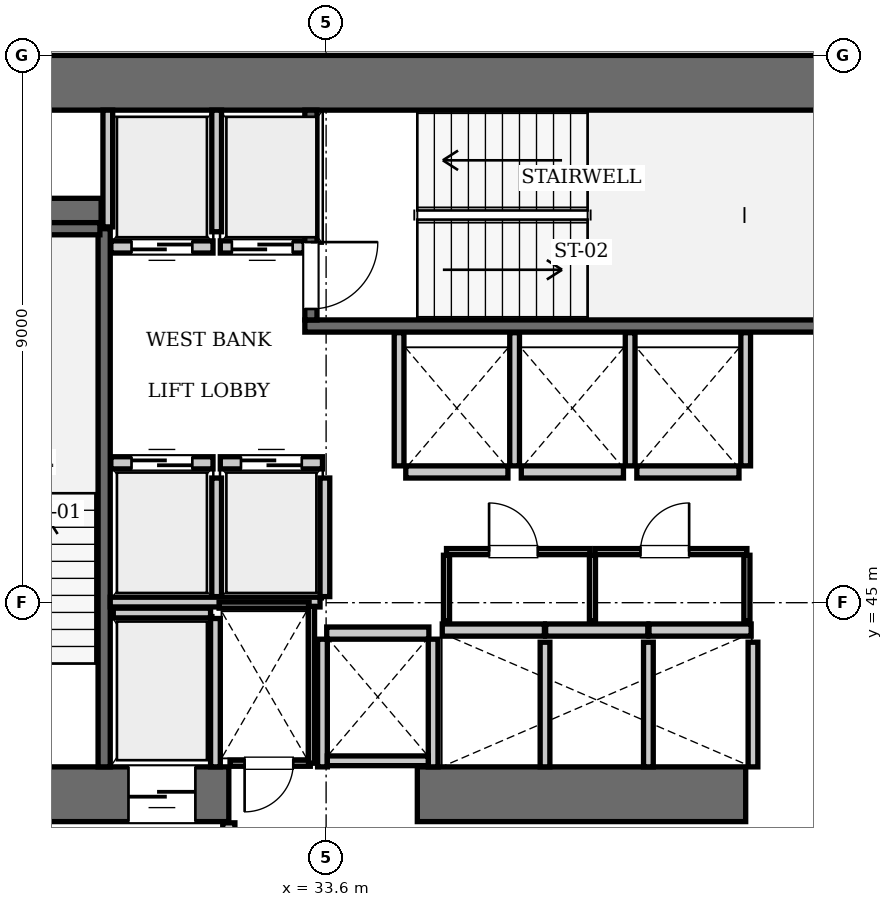
"""IFC4 building model, lengths in metres.
Left out: names, types, materials, properties, quantities, classifications, styles, units other than length and angle.
Written with IfcOpenShell. Run it as: python <this file> out.ifc"""

import sys

from ifc_helpers import new_model, si_unit, direction, frame, frame_2d, origin, place, context, subcontext, project, spatial, rectangle, extrude, element, fill, save


model = new_model("IFC4")
c1 = context("Model", 3, precision=1e-05, world=origin(), true_north=direction((0.0, 1.0)))
c2 = subcontext(c1, "Body", "Model", "MODEL_VIEW")
j1 = project(units=[si_unit("LENGTHUNIT", "METRE"), si_unit("PLANEANGLEUNIT", "RADIAN")], contexts=[c1])
p1 = place(None, origin())
s1 = spatial("IfcSite", under=j1, at=p1, CompositionType="ELEMENT")
p2 = place(p1, origin())
s2 = spatial("IfcBuilding", under=s1, at=p2, CompositionType="ELEMENT")
p3 = place(p2, frame((0.0, 0.0, 107.8)))
s3 = spatial("IfcBuildingStorey", under=s2, at=p3, CompositionType="ELEMENT", Elevation=107.8)
p4 = place(p3, frame((25.2, 53.55, 0.0), z_axis=(0.0, 0.0, 1.0), x_axis=(1.0, 0.0, 0.0)))
e1 = element("IfcWall", 1, at=p4, inside=s3, PredefinedType="SHEAR", context=c2, shape_type="SweptSolid", body=[
    extrude(rectangle(XDim=25.2, YDim=0.9, at=frame_2d((12.6, 0.0))), origin(), (0.0, 0.0, 1.0), 3.85),
])
p5 = place(p3, frame((25.2, 41.85, 0.0), z_axis=(0.0, 0.0, 1.0), x_axis=(1.0, 0.0, 0.0)))
e2 = element("IfcWall", 2, at=p5, inside=s3, PredefinedType="SHEAR", context=c2, shape_type="SweptSolid", body=[
    extrude(rectangle(XDim=6.8, YDim=0.9, at=frame_2d((3.4, 0.0))), origin(), (0.0, 0.0, 1.0), 3.85),
])
p6 = place(p5, frame((1.65, 0.0, 0.0)))
e3 = element("IfcOpeningElement", 3, at=p6, cuts=e2, PredefinedType="OPENING", context=c2, shape_type="SweptSolid", body=[
    extrude(rectangle(XDim=1.15, YDim=2.15, at=frame_2d((0.575, 1.075))), frame((0.0, 0.46, 0.0), z_axis=(0.0, -1.0, 0.0), x_axis=(1.0, 0.0, 0.0)), (0.0, 0.0, 1.0), 0.92),
])
p7 = place(p5, frame((5.15, 0.0, 0.0)))
e4 = element("IfcOpeningElement", 4, at=p7, cuts=e2, PredefinedType="OPENING", context=c2, shape_type="SweptSolid", body=[
    extrude(rectangle(XDim=1.1, YDim=2.2, at=frame_2d((0.55, 1.1))), frame((0.0, 0.46, 0.0), z_axis=(0.0, -1.0, 0.0), x_axis=(1.0, 0.0, 0.0)), (0.0, 0.0, 1.0), 0.92),
])
p8 = place(p3, frame((35.1, 41.85, 0.0), z_axis=(0.0, 0.0, 1.0), x_axis=(1.0, 0.0, 0.0)))
e5 = element("IfcWall", 5, at=p8, inside=s3, PredefinedType="SHEAR", context=c2, shape_type="SweptSolid", body=[
    extrude(rectangle(XDim=5.4, YDim=0.9, at=frame_2d((2.7, 0.0))), origin(), (0.0, 0.0, 1.0), 3.85),
])
p9 = place(p3, frame((26.1, 51.4, 0.0), z_axis=(0.0, 0.0, 1.0), x_axis=(1.0, 0.0, 0.0)))
e6 = element("IfcWall", 6, at=p9, inside=s3, PredefinedType="SHEAR", context=c2, shape_type="SweptSolid", body=[
    extrude(rectangle(XDim=3.8, YDim=0.5, at=frame_2d((1.9, 0.0))), origin(), (0.0, 0.0, 1.0), 3.85),
])
p10 = place(p3, frame((29.95, 42.3, 0.0), z_axis=(0.0, 0.0, 1.0), x_axis=(0.0, 1.0, 0.0)))
e7 = element("IfcWall", 7, at=p10, inside=s3, PredefinedType="SOLIDWALL", context=c2, shape_type="SweptSolid", body=[
    extrude(rectangle(XDim=8.85, YDim=0.2, at=frame_2d((4.425, 0.0))), origin(), (0.0, 0.0, 1.0), 3.61),
])
p11 = place(p3, frame((26.38, 51.15, 0.0), z_axis=(0.0, 0.0, 1.0), x_axis=(1.0, 0.0, 0.0)))
e8 = element("IfcWall", 8, at=p11, inside=s3, PredefinedType="SOLIDWALL", context=c2, shape_type="SweptSolid", body=[
    extrude(rectangle(XDim=3.5, YDim=0.2, at=frame_2d((1.75, 0.0))), origin(), (0.0, 0.0, 1.0), 3.61),
])
p12 = place(p3, frame((33.25, 49.55, 0.0), z_axis=(0.0, 0.0, 1.0), x_axis=(1.0, 0.0, 0.0)))
e9 = element("IfcWall", 9, at=p12, inside=s3, PredefinedType="SOLIDWALL", context=c2, shape_type="SweptSolid", body=[
    extrude(rectangle(XDim=9.1, YDim=0.2, at=frame_2d((4.55, 0.0))), origin(), (0.0, 0.0, 1.0), 3.61),
])
p13 = place(p3, frame((33.35, 49.65, 0.0), z_axis=(0.0, 0.0, 1.0), x_axis=(0.0, 1.0, 0.0)))
e10 = element("IfcWall", 10, at=p13, inside=s3, PredefinedType="SOLIDWALL", context=c2, shape_type="SweptSolid", body=[
    extrude(rectangle(XDim=3.45, YDim=0.2, at=frame_2d((1.725, 0.0))), origin(), (0.0, 0.0, 1.0), 3.61),
])
p14 = place(p13, frame((0.18, 0.0, 0.0)))
e11 = element("IfcOpeningElement", 11, at=p14, cuts=e10, PredefinedType="OPENING", context=c2, shape_type="SweptSolid", body=[
    extrude(rectangle(XDim=1.1, YDim=2.15, at=frame_2d((0.55, 1.075))), frame((0.0, 0.11, 0.0), z_axis=(0.0, -1.0, 0.0), x_axis=(1.0, 0.0, 0.0)), (0.0, 0.0, 1.0), 0.22),
])
p15 = place(p3, frame((30.06, 47.3, 0.0), z_axis=(0.0, 0.0, 1.0), x_axis=(1.0, 0.0, 0.0)))
e12 = element("IfcWall", 12, at=p15, inside=s3, PredefinedType="SOLIDWALL", context=c2, shape_type="SweptSolid", body=[
    extrude(rectangle(XDim=1.68, YDim=0.2, at=frame_2d((0.84, 0.0))), origin(), (0.0, 0.0, 1.0), 3.61),
])
p16 = place(p15, frame((0.34, 0.0, 0.0)))
e13 = element("IfcOpeningElement", 13, at=p16, cuts=e12, PredefinedType="OPENING", context=c2, shape_type="SweptSolid", body=[
    extrude(rectangle(XDim=1.0, YDim=2.15, at=frame_2d((0.5, 1.075))), frame((0.0, 0.11, 0.0), z_axis=(0.0, -1.0, 0.0), x_axis=(1.0, 0.0, 0.0)), (0.0, 0.0, 1.0), 0.22),
])
p17 = place(p3, frame((31.86, 47.3, 0.0), z_axis=(0.0, 0.0, 1.0), x_axis=(1.0, 0.0, 0.0)))
e14 = element("IfcWall", 14, at=p17, inside=s3, PredefinedType="SOLIDWALL", context=c2, shape_type="SweptSolid", body=[
    extrude(rectangle(XDim=1.68, YDim=0.2, at=frame_2d((0.84, 0.0))), origin(), (0.0, 0.0, 1.0), 3.61),
])
p18 = place(p17, frame((0.34, 0.0, 0.0)))
e15 = element("IfcOpeningElement", 15, at=p18, cuts=e14, PredefinedType="OPENING", context=c2, shape_type="SweptSolid", body=[
    extrude(rectangle(XDim=1.0, YDim=2.15, at=frame_2d((0.5, 1.075))), frame((0.0, 0.11, 0.0), z_axis=(0.0, -1.0, 0.0), x_axis=(1.0, 0.0, 0.0)), (0.0, 0.0, 1.0), 0.22),
])
p19 = place(p3, frame((30.06, 50.85, 0.0), z_axis=(0.0, 0.0, 1.0), x_axis=(1.0, 0.0, 0.0)))
e16 = element("IfcWall", 16, at=p19, inside=s3, PredefinedType="SOLIDWALL", context=c2, shape_type="SweptSolid", body=[
    extrude(rectangle(XDim=1.68, YDim=0.2, at=frame_2d((0.84, 0.0))), origin(), (0.0, 0.0, 1.0), 3.61),
])
p20 = place(p19, frame((0.34, 0.0, 0.0)))
e17 = element("IfcOpeningElement", 17, at=p20, cuts=e16, PredefinedType="OPENING", context=c2, shape_type="SweptSolid", body=[
    extrude(rectangle(XDim=1.0, YDim=2.15, at=frame_2d((0.5, 1.075))), frame((0.0, 0.11, 0.0), z_axis=(0.0, -1.0, 0.0), x_axis=(1.0, 0.0, 0.0)), (0.0, 0.0, 1.0), 0.22),
])
p21 = place(p3, frame((31.86, 50.85, 0.0), z_axis=(0.0, 0.0, 1.0), x_axis=(1.0, 0.0, 0.0)))
e18 = element("IfcWall", 18, at=p21, inside=s3, PredefinedType="SOLIDWALL", context=c2, shape_type="SweptSolid", body=[
    extrude(rectangle(XDim=1.38, YDim=0.2, at=frame_2d((0.69, 0.0))), origin(), (0.0, 0.0, 1.0), 3.61),
])
p22 = place(p21, frame((0.19, 0.0, 0.0)))
e19 = element("IfcOpeningElement", 19, at=p22, cuts=e18, PredefinedType="OPENING", context=c2, shape_type="SweptSolid", body=[
    extrude(rectangle(XDim=1.0, YDim=2.15, at=frame_2d((0.5, 1.075))), frame((0.0, 0.11, 0.0), z_axis=(0.0, -1.0, 0.0), x_axis=(1.0, 0.0, 0.0)), (0.0, 0.0, 1.0), 0.22),
])
for number, where, z_axis, x_axis in (
    (20, (35.51, 44.55, 0.0), (0.0, 0.0, 1.0), (1.0, 0.0, 0.0)),
    (21, (37.21, 44.55, 0.0), (0.0, 0.0, 1.0), (1.0, 0.0, 0.0)),
):
    element("IfcWall", number, at=place(p3, frame(where, z_axis=z_axis, x_axis=x_axis)), inside=s3, PredefinedType="SOLIDWALL", context=c2, shape_type="SweptSolid", body=[
        extrude(rectangle(XDim=1.68, YDim=0.2, at=frame_2d((0.84, 0.0))), origin(), (0.0, 0.0, 1.0), 3.61),
    ])
for number, where, z_axis, x_axis in (
    (22, (38.91, 44.55, 0.0), (0.0, 0.0, 1.0), (1.0, 0.0, 0.0)),
    (23, (34.91, 47.15, 0.0), (0.0, 0.0, 1.0), (1.0, 0.0, 0.0)),
):
    element("IfcWall", number, at=place(p3, frame(where, z_axis=z_axis, x_axis=x_axis)), inside=s3, PredefinedType="SOLIDWALL", context=c2, shape_type="SweptSolid", body=[
        extrude(rectangle(XDim=1.68, YDim=0.2, at=frame_2d((0.84, 0.0))), origin(), (0.0, 0.0, 1.0), 3.61),
    ])
for number, where, z_axis, x_axis in (
    (24, (36.81, 47.15, 0.0), (0.0, 0.0, 1.0), (1.0, 0.0, 0.0)),
    (25, (38.71, 47.15, 0.0), (0.0, 0.0, 1.0), (1.0, 0.0, 0.0)),
    (26, (33.61, 44.5, 0.0), (0.0, 0.0, 1.0), (1.0, 0.0, 0.0)),
):
    element("IfcWall", number, at=place(p3, frame(where, z_axis=z_axis, x_axis=x_axis)), inside=s3, PredefinedType="SOLIDWALL", context=c2, shape_type="SweptSolid", body=[
        extrude(rectangle(XDim=1.68, YDim=0.2, at=frame_2d((0.84, 0.0))), origin(), (0.0, 0.0, 1.0), 3.61),
    ])
p23 = place(p3, frame((30.1, 44.83, 0.0), z_axis=(0.0, 0.0, 1.0), x_axis=(1.0, 0.0, 0.0)))
e27 = element("IfcWall", 27, at=p23, inside=s3, PredefinedType="SOLIDWALL", context=c2, shape_type="SweptSolid", body=[
    extrude(rectangle(XDim=1.6, YDim=0.16, at=frame_2d((0.8, 0.0))), origin(), (0.0, 0.0, 1.0), 3.61),
])
p24 = place(p3, frame((31.78, 42.3, 0.0), z_axis=(0.0, 0.0, 1.0), x_axis=(0.0, 1.0, 0.0)))
e28 = element("IfcWall", 28, at=p24, inside=s3, PredefinedType="SOLIDWALL", context=c2, shape_type="SweptSolid", body=[
    extrude(rectangle(XDim=2.44, YDim=0.16, at=frame_2d((1.22, 0.0))), origin(), (0.0, 0.0, 1.0), 3.61),
])
for number, where, z_axis, x_axis in (
    (29, (31.8, 45.1, 0.0), (0.0, 0.0, 1.0), (0.0, 1.0, 0.0)),
    (30, (33.58, 45.1, 0.0), (0.0, 0.0, 1.0), (0.0, 1.0, 0.0)),
):
    element("IfcWall", number, at=place(p3, frame(where, z_axis=z_axis, x_axis=x_axis)), inside=s3, PredefinedType="SOLIDWALL", context=c2, shape_type="SweptSolid", body=[
        extrude(rectangle(XDim=1.95, YDim=0.16, at=frame_2d((0.975, 0.0))), origin(), (0.0, 0.0, 1.0), 3.61),
    ])
p25 = place(p3, frame((30.05, 45.01, 0.0), z_axis=(0.0, 0.0, 1.0), x_axis=(1.0, 0.0, 0.0)))
e31 = element("IfcWall", 31, at=p25, inside=s3, PredefinedType="SOLIDWALL", context=c2, shape_type="SweptSolid", body=[
    extrude(rectangle(XDim=3.45, YDim=0.16, at=frame_2d((1.725, 0.0))), origin(), (0.0, 0.0, 1.0), 3.61),
])
p26 = place(p3, frame((30.01, 51.18, 0.0), z_axis=(0.0, 0.0, 1.0), x_axis=(0.0, 1.0, 0.0)))
e32 = element("IfcWall", 32, at=p26, inside=s3, PredefinedType="SOLIDWALL", context=c2, shape_type="SweptSolid", body=[
    extrude(rectangle(XDim=1.92, YDim=0.16, at=frame_2d((0.96, 0.0))), origin(), (0.0, 0.0, 1.0), 3.61),
])
p27 = place(p3, frame((31.8, 51.1, 0.0), z_axis=(0.0, 0.0, 1.0), x_axis=(0.0, 1.0, 0.0)))
e33 = element("IfcWall", 33, at=p27, inside=s3, PredefinedType="SOLIDWALL", context=c2, shape_type="SweptSolid", body=[
    extrude(rectangle(XDim=2.0, YDim=0.16, at=frame_2d((1.0, 0.0))), origin(), (0.0, 0.0, 1.0), 3.61),
])
for number, where, z_axis, x_axis in (
    (34, (37.2, 42.3, 0.0), (0.0, 0.0, 1.0), (0.0, 1.0, 0.0)),
    (35, (38.9, 42.3, 0.0), (0.0, 0.0, 1.0), (0.0, 1.0, 0.0)),
    (36, (40.62, 42.3, 0.0), (0.0, 0.0, 1.0), (0.0, 1.0, 0.0)),
):
    element("IfcWall", number, at=place(p3, frame(where, z_axis=z_axis, x_axis=x_axis)), inside=s3, PredefinedType="SOLIDWALL", context=c2, shape_type="SweptSolid", body=[
        extrude(rectangle(XDim=2.05, YDim=0.16, at=frame_2d((1.025, 0.0))), origin(), (0.0, 0.0, 1.0), 3.61),
    ])
for number, where, z_axis, x_axis in (
    (37, (34.8, 47.25, 0.0), (0.0, 0.0, 1.0), (0.0, 1.0, 0.0)),
    (38, (36.7, 47.25, 0.0), (0.0, 0.0, 1.0), (0.0, 1.0, 0.0)),
    (39, (38.6, 47.25, 0.0), (0.0, 0.0, 1.0), (0.0, 1.0, 0.0)),
    (40, (40.5, 47.25, 0.0), (0.0, 0.0, 1.0), (0.0, 1.0, 0.0)),
):
    element("IfcWall", number, at=place(p3, frame(where, z_axis=z_axis, x_axis=x_axis)), inside=s3, PredefinedType="SOLIDWALL", context=c2, shape_type="SweptSolid", body=[
        extrude(rectangle(XDim=2.19, YDim=0.16, at=frame_2d((1.095, 0.0))), origin(), (0.0, 0.0, 1.0), 3.61),
    ])
for number, where, z_axis, x_axis in (
    (41, (33.54, 42.3, 0.0), (0.0, 0.0, 1.0), (0.0, 1.0, 0.0)),
    (42, (35.36, 42.3, 0.0), (0.0, 0.0, 1.0), (0.0, 1.0, 0.0)),
):
    element("IfcWall", number, at=place(p3, frame(where, z_axis=z_axis, x_axis=x_axis)), inside=s3, PredefinedType="SOLIDWALL", context=c2, shape_type="SweptSolid", body=[
        extrude(rectangle(XDim=2.1, YDim=0.16, at=frame_2d((1.05, 0.0))), origin(), (0.0, 0.0, 1.0), 3.61),
    ])
p28 = place(p3, frame((33.62, 42.4, 0.0), z_axis=(0.0, 0.0, 1.0), x_axis=(1.0, 0.0, 0.0)))
e43 = element("IfcWall", 43, at=p28, inside=s3, PredefinedType="SOLIDWALL", context=c2, shape_type="SweptSolid", body=[
    extrude(rectangle(XDim=1.66, YDim=0.16, at=frame_2d((0.83, 0.0))), origin(), (0.0, 0.0, 1.0), 3.61),
])
p29 = place(p3, frame((32.0, 38.31, 0.0), z_axis=(0.0, 0.0, 1.0), x_axis=(0.0, 1.0, 0.0)))
e44 = element("IfcWall", 44, at=p29, inside=s3, PredefinedType="PARTITIONING", context=c2, shape_type="SweptSolid", body=[
    extrude(rectangle(XDim=3.07, YDim=0.2, at=frame_2d((1.535, 0.0))), origin(), (0.0, 0.0, 1.0), 3.61),
])
p30 = place(p3, frame((32.02, 42.36, 0.0), z_axis=(0.0, 0.0, 1.0), x_axis=(1.0, 0.0, 0.0)))
e45 = element("IfcWall", 45, at=p30, inside=s3, PredefinedType="PARTITIONING", context=c2, shape_type="SweptSolid", body=[
    extrude(rectangle(XDim=1.32, YDim=0.1, at=frame_2d((0.66, 0.0))), origin(), (0.0, 0.0, 1.0), 3.61),
])
p31 = place(p30, frame((0.24, 0.0, 0.0)))
e46 = element("IfcOpeningElement", 46, at=p31, cuts=e45, PredefinedType="OPENING", context=c2, shape_type="SweptSolid", body=[
    extrude(rectangle(XDim=0.8, YDim=2.05, at=frame_2d((0.4, 1.025))), frame((0.0, 0.06, 0.0), z_axis=(0.0, -1.0, 0.0), x_axis=(1.0, 0.0, 0.0)), (0.0, 0.0, 1.0), 0.12),
])
p32 = place(p3, frame((31.84, 44.96, 0.0), z_axis=(0.0, 0.0, 1.0), x_axis=(1.0, 0.0, 0.0)))
e47 = element("IfcWall", 47, at=p32, inside=s3, PredefinedType="PARTITIONING", context=c2, shape_type="SweptSolid", body=[
    extrude(rectangle(XDim=1.48, YDim=0.1, at=frame_2d((0.74, 0.0))), origin(), (0.0, 0.0, 1.0), 3.61),
])
p33 = place(p3, frame((33.36, 42.36, 0.0), z_axis=(0.0, 0.0, 1.0), x_axis=(0.0, 1.0, 0.0)))
e48 = element("IfcWall", 48, at=p33, inside=s3, PredefinedType="PARTITIONING", context=c2, shape_type="SweptSolid", body=[
    extrude(rectangle(XDim=2.58, YDim=0.1, at=frame_2d((1.29, 0.0))), origin(), (0.0, 0.0, 1.0), 3.61),
])
p34 = place(p3, frame((35.58, 45.84, 0.0), z_axis=(0.0, 0.0, 1.0), x_axis=(1.0, 0.0, 0.0)))
e49 = element("IfcWall", 49, at=p34, inside=s3, PredefinedType="PARTITIONING", context=c2, shape_type="SweptSolid", body=[
    extrude(rectangle(XDim=2.36, YDim=0.1, at=frame_2d((1.18, 0.0))), origin(), (0.0, 0.0, 1.0), 3.61),
])
p35 = place(p34, frame((0.7, 0.0, 0.0)))
e50 = element("IfcOpeningElement", 50, at=p35, cuts=e49, PredefinedType="OPENING", context=c2, shape_type="SweptSolid", body=[
    extrude(rectangle(XDim=0.8, YDim=2.05, at=frame_2d((0.4, 1.025))), frame((0.0, 0.06, 0.0), z_axis=(0.0, -1.0, 0.0), x_axis=(1.0, 0.0, 0.0)), (0.0, 0.0, 1.0), 0.12),
])
p36 = place(p3, frame((38.02, 45.84, 0.0), z_axis=(0.0, 0.0, 1.0), x_axis=(1.0, 0.0, 0.0)))
e51 = element("IfcWall", 51, at=p36, inside=s3, PredefinedType="PARTITIONING", context=c2, shape_type="SweptSolid", body=[
    extrude(rectangle(XDim=2.5, YDim=0.1, at=frame_2d((1.25, 0.0))), origin(), (0.0, 0.0, 1.0), 3.61),
])
p37 = place(p36, frame((0.75, 0.0, 0.0)))
e52 = element("IfcOpeningElement", 52, at=p37, cuts=e51, PredefinedType="OPENING", context=c2, shape_type="SweptSolid", body=[
    extrude(rectangle(XDim=0.8, YDim=2.05, at=frame_2d((0.4, 1.025))), frame((0.0, 0.06, 0.0), z_axis=(0.0, -1.0, 0.0), x_axis=(1.0, 0.0, 0.0)), (0.0, 0.0, 1.0), 0.12),
])
for number, where, z_axis, x_axis in (
    (53, (35.58, 44.7, 0.0), (0.0, 0.0, 1.0), (0.0, 1.0, 0.0)),
    (54, (37.98, 44.7, 0.0), (0.0, 0.0, 1.0), (0.0, 1.0, 0.0)),
    (55, (40.52, 44.7, 0.0), (0.0, 0.0, 1.0), (0.0, 1.0, 0.0)),
):
    element("IfcWall", number, at=place(p3, frame(where, z_axis=z_axis, x_axis=x_axis)), inside=s3, PredefinedType="PARTITIONING", context=c2, shape_type="SweptSolid", body=[
        extrude(rectangle(XDim=1.08, YDim=0.1, at=frame_2d((0.54, 0.0))), origin(), (0.0, 0.0, 1.0), 3.61),
    ])
p38 = place(p14, frame((1.1, 0.0, 0.0), z_axis=(0.0, 0.0, 1.0), x_axis=(-1.0, 0.0, 0.0)))
e56 = element("IfcDoor", 56, at=p38, inside=s3, OperationType="SINGLE_SWING_LEFT", PredefinedType="DOOR", context=c2, shape_type="SweptSolid", body=[
    extrude(rectangle(XDim=1.1, YDim=2.15, at=frame_2d((0.55, 1.075))), frame((0.0, 0.025, 0.0), z_axis=(0.0, -1.0, 0.0), x_axis=(1.0, 0.0, 0.0)), (0.0, 0.0, 1.0), 0.05),
])
fill(e11, e56)
p39 = place(p16, origin())
e57 = element("IfcDoor", 57, at=p39, inside=s3, OperationType="SLIDING_TO_LEFT", PredefinedType="DOOR", context=c2, shape_type="SweptSolid", body=[
    extrude(rectangle(XDim=1.0, YDim=2.15, at=frame_2d((0.5, 1.075))), frame((0.0, 0.025, 0.0), z_axis=(0.0, -1.0, 0.0), x_axis=(1.0, 0.0, 0.0)), (0.0, 0.0, 1.0), 0.05),
])
fill(e13, e57)
p40 = place(p18, origin())
e58 = element("IfcDoor", 58, at=p40, inside=s3, OperationType="SLIDING_TO_LEFT", PredefinedType="DOOR", context=c2, shape_type="SweptSolid", body=[
    extrude(rectangle(XDim=1.0, YDim=2.15, at=frame_2d((0.5, 1.075))), frame((0.0, 0.025, 0.0), z_axis=(0.0, -1.0, 0.0), x_axis=(1.0, 0.0, 0.0)), (0.0, 0.0, 1.0), 0.05),
])
fill(e15, e58)
p41 = place(p20, frame((1.0, 0.0, 0.0), z_axis=(0.0, 0.0, 1.0), x_axis=(-1.0, 0.0, 0.0)))
e59 = element("IfcDoor", 59, at=p41, inside=s3, OperationType="SLIDING_TO_LEFT", PredefinedType="DOOR", context=c2, shape_type="SweptSolid", body=[
    extrude(rectangle(XDim=1.0, YDim=2.15, at=frame_2d((0.5, 1.075))), frame((0.0, 0.025, 0.0), z_axis=(0.0, -1.0, 0.0), x_axis=(1.0, 0.0, 0.0)), (0.0, 0.0, 1.0), 0.05),
])
fill(e17, e59)
p42 = place(p22, frame((1.0, 0.0, 0.0), z_axis=(0.0, 0.0, 1.0), x_axis=(-1.0, 0.0, 0.0)))
e60 = element("IfcDoor", 60, at=p42, inside=s3, OperationType="SLIDING_TO_LEFT", PredefinedType="DOOR", context=c2, shape_type="SweptSolid", body=[
    extrude(rectangle(XDim=1.0, YDim=2.15, at=frame_2d((0.5, 1.075))), frame((0.0, 0.025, 0.0), z_axis=(0.0, -1.0, 0.0), x_axis=(1.0, 0.0, 0.0)), (0.0, 0.0, 1.0), 0.05),
])
fill(e19, e60)
p43 = place(p7, frame((1.1, 0.0, 0.0), z_axis=(0.0, 0.0, 1.0), x_axis=(-1.0, 0.0, 0.0)))
e61 = element("IfcDoor", 61, at=p43, inside=s3, OperationType="SLIDING_TO_LEFT", PredefinedType="DOOR", context=c2, shape_type="SweptSolid", body=[
    extrude(rectangle(XDim=1.1, YDim=2.2, at=frame_2d((0.55, 1.1))), frame((0.0, 0.025, 0.0), z_axis=(0.0, -1.0, 0.0), x_axis=(1.0, 0.0, 0.0)), (0.0, 0.0, 1.0), 0.05),
])
fill(e4, e61)
p44 = place(p31, frame((0.8, 0.0, 0.0), z_axis=(0.0, 0.0, 1.0), x_axis=(-1.0, 0.0, 0.0)))
e62 = element("IfcDoor", 62, at=p44, inside=s3, OperationType="SINGLE_SWING_RIGHT", PredefinedType="DOOR", context=c2, shape_type="SweptSolid", body=[
    extrude(rectangle(XDim=0.8, YDim=2.05, at=frame_2d((0.4, 1.025))), frame((0.0, 0.025, 0.0), z_axis=(0.0, -1.0, 0.0), x_axis=(1.0, 0.0, 0.0)), (0.0, 0.0, 1.0), 0.05),
])
fill(e46, e62)
p45 = place(p35, origin())
e63 = element("IfcDoor", 63, at=p45, inside=s3, OperationType="SINGLE_SWING_LEFT", PredefinedType="DOOR", context=c2, shape_type="SweptSolid", body=[
    extrude(rectangle(XDim=0.8, YDim=2.05, at=frame_2d((0.4, 1.025))), frame((0.0, 0.025, 0.0), z_axis=(0.0, -1.0, 0.0), x_axis=(1.0, 0.0, 0.0)), (0.0, 0.0, 1.0), 0.05),
])
fill(e50, e63)
p46 = place(p37, origin())
e64 = element("IfcDoor", 64, at=p46, inside=s3, OperationType="SINGLE_SWING_RIGHT", PredefinedType="DOOR", context=c2, shape_type="SweptSolid", body=[
    extrude(rectangle(XDim=0.8, YDim=2.05, at=frame_2d((0.4, 1.025))), frame((0.0, 0.025, 0.0), z_axis=(0.0, -1.0, 0.0), x_axis=(1.0, 0.0, 0.0)), (0.0, 0.0, 1.0), 0.05),
])
fill(e52, e64)
save(model, sys.argv[1])
